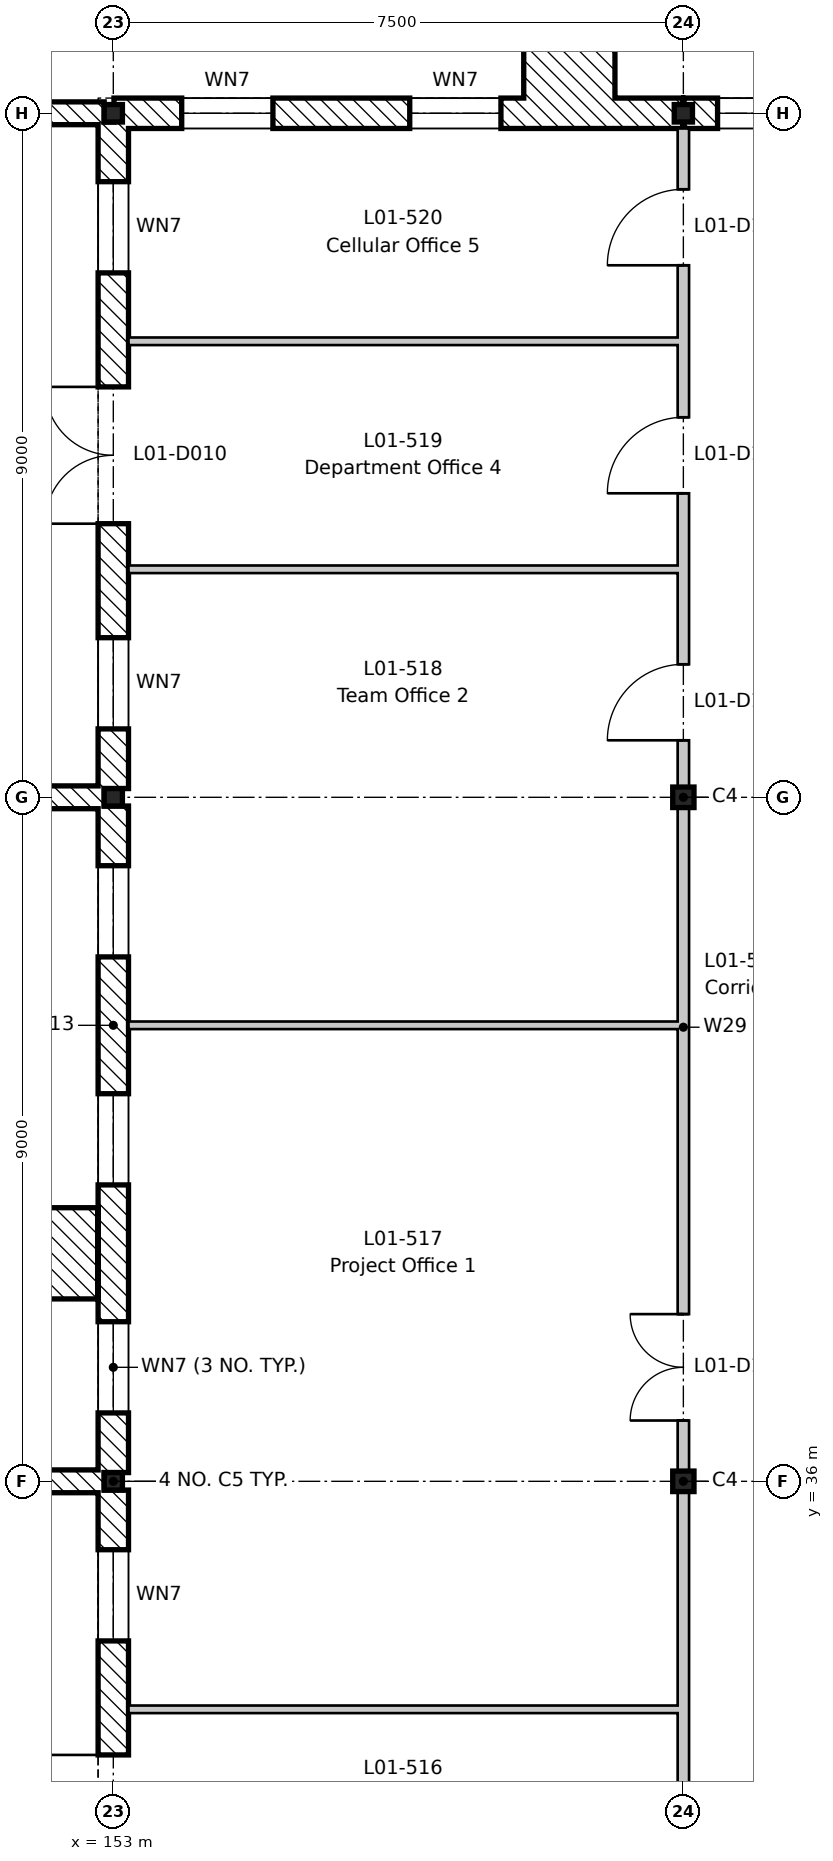
"""IFC4 building model, lengths in metres.
Left out: names, types, materials, properties, quantities, classifications, styles, units other than length and angle.
Written with IfcOpenShell. Run it as: python <this file> out.ifc"""

import sys

from ifc_helpers import new_model, si_unit, direction, frame, frame_2d, origin, origin_2d, place, context, subcontext, project, spatial, rectangle, i_section, extrude, element, fill, save


model = new_model("IFC4")
c1 = context("Model", 3, precision=1e-05, world=origin(), true_north=direction((0.0, 1.0)))
c2 = subcontext(c1, "Body", "Model", "MODEL_VIEW")
j1 = project(units=[si_unit("LENGTHUNIT", "METRE"), si_unit("PLANEANGLEUNIT", "RADIAN")], contexts=[c1])
p1 = place(None, origin())
s1 = spatial("IfcSite", under=j1, at=p1, CompositionType="ELEMENT")
p2 = place(p1, origin())
s2 = spatial("IfcBuilding", under=s1, at=p2, CompositionType="ELEMENT")
p3 = place(p2, frame((0.0, 0.0, 5.4)))
s3 = spatial("IfcBuildingStorey", under=s2, at=p3, CompositionType="ELEMENT", Elevation=5.4)
for number, where, z_axis, x_axis in (
    (1, (153.0, 36.0, -0.2), (0.0, 0.0, 1.0), (1.0, 0.0, 0.0)),
    (2, (153.0, 45.0, -0.2), (0.0, 0.0, 1.0), (1.0, 0.0, 0.0)),
    (3, (153.0, 54.0, -0.2), (0.0, 0.0, 1.0), (1.0, 0.0, 0.0)),
):
    element("IfcColumn", number, at=place(p3, frame(where, z_axis=z_axis, x_axis=x_axis)), inside=s3, PredefinedType="COLUMN", context=c2, shape_type="SweptSolid", body=[
        extrude(i_section(OverallWidth=0.24, OverallDepth=0.23, WebThickness=0.008, FlangeThickness=0.012, FilletRadius=0.021, at=origin_2d()), origin(), (0.0, 0.0, 1.0), 4.5),
    ])
for number, where, z_axis, x_axis in (
    (4, (160.5, 36.0, -0.2), (0.0, 0.0, 1.0), (1.0, 0.0, 0.0)),
    (5, (160.5, 45.0, -0.2), (0.0, 0.0, 1.0), (1.0, 0.0, 0.0)),
):
    element("IfcColumn", number, at=place(p3, frame(where, z_axis=z_axis, x_axis=x_axis)), inside=s3, PredefinedType="COLUMN", context=c2, shape_type="SweptSolid", body=[
        extrude(i_section(OverallWidth=0.28, OverallDepth=0.27, WebThickness=0.008, FlangeThickness=0.013, FilletRadius=0.024, at=origin_2d()), origin(), (0.0, 0.0, 1.0), 4.5),
    ])
p4 = place(p3, frame((160.5, 54.0, -0.2), z_axis=(0.0, 0.0, 1.0), x_axis=(1.0, 0.0, 0.0)))
e6 = element("IfcColumn", 6, at=p4, inside=s3, PredefinedType="COLUMN", context=c2, shape_type="SweptSolid", body=[
    extrude(i_section(OverallWidth=0.24, OverallDepth=0.23, WebThickness=0.008, FlangeThickness=0.012, FilletRadius=0.021, at=origin_2d()), origin(), (0.0, 0.0, 1.0), 4.5),
])
p5 = place(p3, frame((153.0, 27.115, 0.0), z_axis=(0.0, 0.0, 1.0), x_axis=(0.0, 1.0, 0.0)))
e7 = element("IfcWall", 7, at=p5, inside=s3, PredefinedType="STANDARD", context=c2, shape_type="SweptSolid", body=[
    extrude(rectangle(XDim=8.77, YDim=0.4, at=frame_2d((4.385, 0.0))), origin(), (0.0, 0.0, 1.0), 3.9),
])
p6 = place(p5, frame((3.485, 0.0, 0.0)))
e8 = element("IfcOpeningElement", 8, at=p6, cuts=e7, PredefinedType="OPENING", context=c2, shape_type="SweptSolid", body=[
    extrude(rectangle(XDim=1.8, YDim=2.4, at=frame_2d((0.9, 1.2))), frame((0.0, 0.21, 0.0), z_axis=(0.0, -1.0, 0.0), x_axis=(1.0, 0.0, 0.0)), (0.0, 0.0, 1.0), 0.42),
])
p7 = place(p5, frame((0.785, 0.0, 0.9)))
e9 = element("IfcOpeningElement", 9, at=p7, cuts=e7, PredefinedType="OPENING", context=c2, shape_type="SweptSolid", body=[
    extrude(rectangle(XDim=1.2, YDim=2.4, at=frame_2d((0.6, 1.2))), frame((0.0, 0.21, 0.0), z_axis=(0.0, -1.0, 0.0), x_axis=(1.0, 0.0, 0.0)), (0.0, 0.0, 1.0), 0.42),
])
p8 = place(p5, frame((6.785, 0.0, 0.9)))
e10 = element("IfcOpeningElement", 10, at=p8, cuts=e7, PredefinedType="OPENING", context=c2, shape_type="SweptSolid", body=[
    extrude(rectangle(XDim=1.2, YDim=2.4, at=frame_2d((0.6, 1.2))), frame((0.0, 0.21, 0.0), z_axis=(0.0, -1.0, 0.0), x_axis=(1.0, 0.0, 0.0)), (0.0, 0.0, 1.0), 0.42),
])
p9 = place(p3, frame((153.0, 36.115, 0.0), z_axis=(0.0, 0.0, 1.0), x_axis=(0.0, 1.0, 0.0)))
e11 = element("IfcWall", 11, at=p9, inside=s3, PredefinedType="STANDARD", context=c2, shape_type="SweptSolid", body=[
    extrude(rectangle(XDim=8.77, YDim=0.4, at=frame_2d((4.385, 0.0))), origin(), (0.0, 0.0, 1.0), 3.9),
])
p10 = place(p9, frame((0.785, 0.0, 0.9)))
e12 = element("IfcOpeningElement", 12, at=p10, cuts=e11, PredefinedType="OPENING", context=c2, shape_type="SweptSolid", body=[
    extrude(rectangle(XDim=1.2, YDim=2.4, at=frame_2d((0.6, 1.2))), frame((0.0, 0.21, 0.0), z_axis=(0.0, -1.0, 0.0), x_axis=(1.0, 0.0, 0.0)), (0.0, 0.0, 1.0), 0.42),
])
p11 = place(p9, frame((3.785, 0.0, 0.9)))
e13 = element("IfcOpeningElement", 13, at=p11, cuts=e11, PredefinedType="OPENING", context=c2, shape_type="SweptSolid", body=[
    extrude(rectangle(XDim=1.2, YDim=2.4, at=frame_2d((0.6, 1.2))), frame((0.0, 0.21, 0.0), z_axis=(0.0, -1.0, 0.0), x_axis=(1.0, 0.0, 0.0)), (0.0, 0.0, 1.0), 0.42),
])
p12 = place(p9, frame((6.785, 0.0, 0.9)))
e14 = element("IfcOpeningElement", 14, at=p12, cuts=e11, PredefinedType="OPENING", context=c2, shape_type="SweptSolid", body=[
    extrude(rectangle(XDim=1.2, YDim=2.4, at=frame_2d((0.6, 1.2))), frame((0.0, 0.21, 0.0), z_axis=(0.0, -1.0, 0.0), x_axis=(1.0, 0.0, 0.0)), (0.0, 0.0, 1.0), 0.42),
])
p13 = place(p3, frame((153.0, 45.115, 0.0), z_axis=(0.0, 0.0, 1.0), x_axis=(0.0, 1.0, 0.0)))
e15 = element("IfcWall", 15, at=p13, inside=s3, PredefinedType="STANDARD", context=c2, shape_type="SweptSolid", body=[
    extrude(rectangle(XDim=8.77, YDim=0.4, at=frame_2d((4.385, 0.0))), origin(), (0.0, 0.0, 1.0), 3.9),
])
p14 = place(p13, frame((3.485, 0.0, 0.0)))
e16 = element("IfcOpeningElement", 16, at=p14, cuts=e15, PredefinedType="OPENING", context=c2, shape_type="SweptSolid", body=[
    extrude(rectangle(XDim=1.8, YDim=2.4, at=frame_2d((0.9, 1.2))), frame((0.0, 0.21, 0.0), z_axis=(0.0, -1.0, 0.0), x_axis=(1.0, 0.0, 0.0)), (0.0, 0.0, 1.0), 0.42),
])
p15 = place(p13, frame((0.785, 0.0, 0.9)))
e17 = element("IfcOpeningElement", 17, at=p15, cuts=e15, PredefinedType="OPENING", context=c2, shape_type="SweptSolid", body=[
    extrude(rectangle(XDim=1.2, YDim=2.4, at=frame_2d((0.6, 1.2))), frame((0.0, 0.21, 0.0), z_axis=(0.0, -1.0, 0.0), x_axis=(1.0, 0.0, 0.0)), (0.0, 0.0, 1.0), 0.42),
])
p16 = place(p13, frame((6.785, 0.0, 0.9)))
e18 = element("IfcOpeningElement", 18, at=p16, cuts=e15, PredefinedType="OPENING", context=c2, shape_type="SweptSolid", body=[
    extrude(rectangle(XDim=1.2, YDim=2.4, at=frame_2d((0.6, 1.2))), frame((0.0, 0.21, 0.0), z_axis=(0.0, -1.0, 0.0), x_axis=(1.0, 0.0, 0.0)), (0.0, 0.0, 1.0), 0.42),
])
p17 = place(p3, frame((153.009, 54.0, 0.0), z_axis=(0.0, 0.0, 1.0), x_axis=(1.0, 0.0, 0.0)))
e19 = element("IfcWall", 19, at=p17, inside=s3, PredefinedType="STANDARD", context=c2, shape_type="SweptSolid", body=[
    extrude(rectangle(XDim=7.482, YDim=0.4, at=frame_2d((3.741, 0.0))), origin(), (0.0, 0.0, 1.0), 3.97),
])
p18 = place(p17, frame((0.891, 0.0, 0.9)))
e20 = element("IfcOpeningElement", 20, at=p18, cuts=e19, PredefinedType="OPENING", context=c2, shape_type="SweptSolid", body=[
    extrude(rectangle(XDim=1.2, YDim=2.4, at=frame_2d((0.6, 1.2))), frame((0.0, 0.21, 0.0), z_axis=(0.0, -1.0, 0.0), x_axis=(1.0, 0.0, 0.0)), (0.0, 0.0, 1.0), 0.42),
])
p19 = place(p17, frame((3.891, 0.0, 0.9)))
e21 = element("IfcOpeningElement", 21, at=p19, cuts=e19, PredefinedType="OPENING", context=c2, shape_type="SweptSolid", body=[
    extrude(rectangle(XDim=1.2, YDim=2.4, at=frame_2d((0.6, 1.2))), frame((0.0, 0.21, 0.0), z_axis=(0.0, -1.0, 0.0), x_axis=(1.0, 0.0, 0.0)), (0.0, 0.0, 1.0), 0.42),
])
p20 = place(p3, frame((160.509, 54.0, 0.0), z_axis=(0.0, 0.0, 1.0), x_axis=(1.0, 0.0, 0.0)))
e22 = element("IfcWall", 22, at=p20, inside=s3, PredefinedType="STANDARD", context=c2, shape_type="SweptSolid", body=[
    extrude(rectangle(XDim=2.982, YDim=0.4, at=frame_2d((1.491, 0.0))), origin(), (0.0, 0.0, 1.0), 4.1),
])
p21 = place(p20, frame((0.441, 0.0, 0.9)))
e23 = element("IfcOpeningElement", 23, at=p21, cuts=e22, PredefinedType="OPENING", context=c2, shape_type="SweptSolid", body=[
    extrude(rectangle(XDim=2.1, YDim=2.1, at=frame_2d((1.05, 1.05))), frame((0.0, 0.21, 0.0), z_axis=(0.0, -1.0, 0.0), x_axis=(1.0, 0.0, 0.0)), (0.0, 0.0, 1.0), 0.42),
])
for number, where, z_axis, x_axis in (
    (24, (152.2, 38.4, 0.0), (0.0, 0.0, 1.0), (0.0, 1.0, 0.0)),
    (25, (158.4, 54.8, 0.0), (0.0, 0.0, 1.0), (1.0, 0.0, 0.0)),
):
    element("IfcWall", number, at=place(p3, frame(where, z_axis=z_axis, x_axis=x_axis)), inside=s3, PredefinedType="STANDARD", context=c2, shape_type="SweptSolid", body=[
        extrude(rectangle(XDim=1.2, YDim=1.2, at=frame_2d((0.6, 0.0))), origin(), (0.0, 0.0, 1.0), 4.5),
    ])
p22 = place(p3, frame((152.88, 36.0, 0.0), z_axis=(0.0, 0.0, 1.0), x_axis=(-1.0, 0.0, 0.0)))
e26 = element("IfcWall", 26, at=p22, inside=s3, PredefinedType="STANDARD", context=c2, shape_type="SweptSolid", body=[
    extrude(rectangle(XDim=2.88, YDim=0.3, at=frame_2d((1.44, 0.0))), origin(), (0.0, 0.0, 1.0), 3.97),
])
for number, where, z_axis, x_axis in (
    (27, (152.88, 45.0, 0.0), (0.0, 0.0, 1.0), (-1.0, 0.0, 0.0)),
    (28, (152.88, 54.0, 0.0), (0.0, 0.0, 1.0), (-1.0, 0.0, 0.0)),
):
    element("IfcWall", number, at=place(p3, frame(where, z_axis=z_axis, x_axis=x_axis)), inside=s3, PredefinedType="STANDARD", context=c2, shape_type="SweptSolid", body=[
        extrude(rectangle(XDim=2.28, YDim=0.3, at=frame_2d((1.14, 0.0))), origin(), (0.0, 0.0, 1.0), 3.97),
    ])
for number, where, z_axis, x_axis in (
    (29, (153.2, 33.0, 0.0), (0.0, 0.0, 1.0), (1.0, 0.0, 0.0)),
    (30, (153.2, 42.0, 0.0), (0.0, 0.0, 1.0), (1.0, 0.0, 0.0)),
    (31, (153.2, 48.0, 0.0), (0.0, 0.0, 1.0), (1.0, 0.0, 0.0)),
    (32, (153.2, 51.0, 0.0), (0.0, 0.0, 1.0), (1.0, 0.0, 0.0)),
):
    element("IfcWall", number, at=place(p3, frame(where, z_axis=z_axis, x_axis=x_axis)), inside=s3, PredefinedType="PARTITIONING", context=c2, shape_type="SweptSolid", body=[
        extrude(rectangle(XDim=7.225, YDim=0.1, at=frame_2d((3.613, 0.0))), origin(), (0.0, 0.0, 1.0), 4.3),
    ])
p23 = place(p3, frame((160.5, -8.8, 0.0), z_axis=(0.0, 0.0, 1.0), x_axis=(0.0, 1.0, 0.0)))
e33 = element("IfcWall", 33, at=p23, inside=s3, PredefinedType="PARTITIONING", context=c2, shape_type="SweptSolid", body=[
    extrude(rectangle(XDim=62.6, YDim=0.15, at=frame_2d((31.3, 0.0))), origin(), (0.0, 0.0, 1.0), 3.78),
])
p24 = place(p23, frame((3.6, 0.0, 0.0)))
e34 = element("IfcOpeningElement", 34, at=p24, cuts=e33, PredefinedType="OPENING", context=c2, shape_type="SweptSolid", body=[
    extrude(rectangle(XDim=1.4, YDim=2.1, at=frame_2d((0.7, 1.05))), frame((0.0, 0.085, 0.0), z_axis=(0.0, -1.0, 0.0), x_axis=(1.0, 0.0, 0.0)), (0.0, 0.0, 1.0), 0.17),
])
p25 = place(p23, frame((9.8, 0.0, 0.0)))
e35 = element("IfcOpeningElement", 35, at=p25, cuts=e33, PredefinedType="OPENING", context=c2, shape_type="SweptSolid", body=[
    extrude(rectangle(XDim=1.0, YDim=2.1, at=frame_2d((0.5, 1.05))), frame((0.0, 0.085, 0.0), z_axis=(0.0, -1.0, 0.0), x_axis=(1.0, 0.0, 0.0)), (0.0, 0.0, 1.0), 0.17),
])
p26 = place(p23, frame((14.3, 0.0, 0.0)))
e36 = element("IfcOpeningElement", 36, at=p26, cuts=e33, PredefinedType="OPENING", context=c2, shape_type="SweptSolid", body=[
    extrude(rectangle(XDim=1.0, YDim=2.1, at=frame_2d((0.5, 1.05))), frame((0.0, 0.085, 0.0), z_axis=(0.0, -1.0, 0.0), x_axis=(1.0, 0.0, 0.0)), (0.0, 0.0, 1.0), 0.17),
])
p27 = place(p23, frame((20.3, 0.0, 0.0)))
e37 = element("IfcOpeningElement", 37, at=p27, cuts=e33, PredefinedType="OPENING", context=c2, shape_type="SweptSolid", body=[
    extrude(rectangle(XDim=1.0, YDim=2.1, at=frame_2d((0.5, 1.05))), frame((0.0, 0.085, 0.0), z_axis=(0.0, -1.0, 0.0), x_axis=(1.0, 0.0, 0.0)), (0.0, 0.0, 1.0), 0.17),
])
p28 = place(p23, frame((24.8, 0.0, 0.0)))
e38 = element("IfcOpeningElement", 38, at=p28, cuts=e33, PredefinedType="OPENING", context=c2, shape_type="SweptSolid", body=[
    extrude(rectangle(XDim=1.0, YDim=2.1, at=frame_2d((0.5, 1.05))), frame((0.0, 0.085, 0.0), z_axis=(0.0, -1.0, 0.0), x_axis=(1.0, 0.0, 0.0)), (0.0, 0.0, 1.0), 0.17),
])
p29 = place(p23, frame((27.8, 0.0, 0.0)))
e39 = element("IfcOpeningElement", 39, at=p29, cuts=e33, PredefinedType="OPENING", context=c2, shape_type="SweptSolid", body=[
    extrude(rectangle(XDim=1.0, YDim=2.1, at=frame_2d((0.5, 1.05))), frame((0.0, 0.085, 0.0), z_axis=(0.0, -1.0, 0.0), x_axis=(1.0, 0.0, 0.0)), (0.0, 0.0, 1.0), 0.17),
])
p30 = place(p23, frame((32.3, 0.0, 0.0)))
e40 = element("IfcOpeningElement", 40, at=p30, cuts=e33, PredefinedType="OPENING", context=c2, shape_type="SweptSolid", body=[
    extrude(rectangle(XDim=1.0, YDim=2.1, at=frame_2d((0.5, 1.05))), frame((0.0, 0.085, 0.0), z_axis=(0.0, -1.0, 0.0), x_axis=(1.0, 0.0, 0.0)), (0.0, 0.0, 1.0), 0.17),
])
p31 = place(p23, frame((36.8, 0.0, 0.0)))
e41 = element("IfcOpeningElement", 41, at=p31, cuts=e33, PredefinedType="OPENING", context=c2, shape_type="SweptSolid", body=[
    extrude(rectangle(XDim=1.0, YDim=2.1, at=frame_2d((0.5, 1.05))), frame((0.0, 0.085, 0.0), z_axis=(0.0, -1.0, 0.0), x_axis=(1.0, 0.0, 0.0)), (0.0, 0.0, 1.0), 0.17),
])
p32 = place(p23, frame((39.8, 0.0, 0.0)))
e42 = element("IfcOpeningElement", 42, at=p32, cuts=e33, PredefinedType="OPENING", context=c2, shape_type="SweptSolid", body=[
    extrude(rectangle(XDim=1.0, YDim=2.1, at=frame_2d((0.5, 1.05))), frame((0.0, 0.085, 0.0), z_axis=(0.0, -1.0, 0.0), x_axis=(1.0, 0.0, 0.0)), (0.0, 0.0, 1.0), 0.17),
])
p33 = place(p23, frame((45.6, 0.0, 0.0)))
e43 = element("IfcOpeningElement", 43, at=p33, cuts=e33, PredefinedType="OPENING", context=c2, shape_type="SweptSolid", body=[
    extrude(rectangle(XDim=1.4, YDim=2.1, at=frame_2d((0.7, 1.05))), frame((0.0, 0.085, 0.0), z_axis=(0.0, -1.0, 0.0), x_axis=(1.0, 0.0, 0.0)), (0.0, 0.0, 1.0), 0.17),
])
p34 = place(p23, frame((54.55, 0.0, 0.0)))
e44 = element("IfcOpeningElement", 44, at=p34, cuts=e33, PredefinedType="OPENING", context=c2, shape_type="SweptSolid", body=[
    extrude(rectangle(XDim=1.0, YDim=2.1, at=frame_2d((0.5, 1.05))), frame((0.0, 0.085, 0.0), z_axis=(0.0, -1.0, 0.0), x_axis=(1.0, 0.0, 0.0)), (0.0, 0.0, 1.0), 0.17),
])
p35 = place(p23, frame((57.8, 0.0, 0.0)))
e45 = element("IfcOpeningElement", 45, at=p35, cuts=e33, PredefinedType="OPENING", context=c2, shape_type="SweptSolid", body=[
    extrude(rectangle(XDim=1.0, YDim=2.1, at=frame_2d((0.5, 1.05))), frame((0.0, 0.085, 0.0), z_axis=(0.0, -1.0, 0.0), x_axis=(1.0, 0.0, 0.0)), (0.0, 0.0, 1.0), 0.17),
])
p36 = place(p23, frame((60.8, 0.0, 0.0)))
e46 = element("IfcOpeningElement", 46, at=p36, cuts=e33, PredefinedType="OPENING", context=c2, shape_type="SweptSolid", body=[
    extrude(rectangle(XDim=1.0, YDim=2.1, at=frame_2d((0.5, 1.05))), frame((0.0, 0.085, 0.0), z_axis=(0.0, -1.0, 0.0), x_axis=(1.0, 0.0, 0.0)), (0.0, 0.0, 1.0), 0.17),
])
p37 = place(p6, origin())
e47 = element("IfcDoor", 47, at=p37, inside=s3, OperationType="DOUBLE_DOOR_SINGLE_SWING", PredefinedType="DOOR", context=c2, shape_type="SweptSolid", body=[
    extrude(rectangle(XDim=1.8, YDim=2.4, at=frame_2d((0.9, 1.2))), frame((0.0, 0.025, 0.0), z_axis=(0.0, -1.0, 0.0), x_axis=(1.0, 0.0, 0.0)), (0.0, 0.0, 1.0), 0.05),
])
fill(e8, e47)
p38 = place(p8, origin())
e48 = element("IfcWindow", 48, at=p38, inside=s3, PartitioningType="SINGLE_PANEL", PredefinedType="WINDOW", context=c2, shape_type="SweptSolid", body=[
    extrude(rectangle(XDim=1.2, YDim=2.4, at=frame_2d((0.6, 1.2))), frame((0.0, -0.12, 0.0), z_axis=(0.0, -1.0, 0.0), x_axis=(1.0, 0.0, 0.0)), (0.0, 0.0, 1.0), 0.06),
])
fill(e10, e48)
p39 = place(p10, origin())
e49 = element("IfcWindow", 49, at=p39, inside=s3, PartitioningType="SINGLE_PANEL", PredefinedType="WINDOW", context=c2, shape_type="SweptSolid", body=[
    extrude(rectangle(XDim=1.2, YDim=2.4, at=frame_2d((0.6, 1.2))), frame((0.0, -0.12, 0.0), z_axis=(0.0, -1.0, 0.0), x_axis=(1.0, 0.0, 0.0)), (0.0, 0.0, 1.0), 0.06),
])
fill(e12, e49)
p40 = place(p11, origin())
e50 = element("IfcWindow", 50, at=p40, inside=s3, PartitioningType="SINGLE_PANEL", PredefinedType="WINDOW", context=c2, shape_type="SweptSolid", body=[
    extrude(rectangle(XDim=1.2, YDim=2.4, at=frame_2d((0.6, 1.2))), frame((0.0, -0.12, 0.0), z_axis=(0.0, -1.0, 0.0), x_axis=(1.0, 0.0, 0.0)), (0.0, 0.0, 1.0), 0.06),
])
fill(e13, e50)
p41 = place(p12, origin())
e51 = element("IfcWindow", 51, at=p41, inside=s3, PartitioningType="SINGLE_PANEL", PredefinedType="WINDOW", context=c2, shape_type="SweptSolid", body=[
    extrude(rectangle(XDim=1.2, YDim=2.4, at=frame_2d((0.6, 1.2))), frame((0.0, -0.12, 0.0), z_axis=(0.0, -1.0, 0.0), x_axis=(1.0, 0.0, 0.0)), (0.0, 0.0, 1.0), 0.06),
])
fill(e14, e51)
p42 = place(p14, origin())
e52 = element("IfcDoor", 52, at=p42, inside=s3, OperationType="DOUBLE_DOOR_SINGLE_SWING", PredefinedType="DOOR", context=c2, shape_type="SweptSolid", body=[
    extrude(rectangle(XDim=1.8, YDim=2.4, at=frame_2d((0.9, 1.2))), frame((0.0, 0.025, 0.0), z_axis=(0.0, -1.0, 0.0), x_axis=(1.0, 0.0, 0.0)), (0.0, 0.0, 1.0), 0.05),
])
fill(e16, e52)
p43 = place(p15, origin())
e53 = element("IfcWindow", 53, at=p43, inside=s3, PartitioningType="SINGLE_PANEL", PredefinedType="WINDOW", context=c2, shape_type="SweptSolid", body=[
    extrude(rectangle(XDim=1.2, YDim=2.4, at=frame_2d((0.6, 1.2))), frame((0.0, -0.12, 0.0), z_axis=(0.0, -1.0, 0.0), x_axis=(1.0, 0.0, 0.0)), (0.0, 0.0, 1.0), 0.06),
])
fill(e17, e53)
p44 = place(p16, origin())
e54 = element("IfcWindow", 54, at=p44, inside=s3, PartitioningType="SINGLE_PANEL", PredefinedType="WINDOW", context=c2, shape_type="SweptSolid", body=[
    extrude(rectangle(XDim=1.2, YDim=2.4, at=frame_2d((0.6, 1.2))), frame((0.0, -0.12, 0.0), z_axis=(0.0, -1.0, 0.0), x_axis=(1.0, 0.0, 0.0)), (0.0, 0.0, 1.0), 0.06),
])
fill(e18, e54)
p45 = place(p18, origin())
e55 = element("IfcWindow", 55, at=p45, inside=s3, PartitioningType="SINGLE_PANEL", PredefinedType="WINDOW", context=c2, shape_type="SweptSolid", body=[
    extrude(rectangle(XDim=1.2, YDim=2.4, at=frame_2d((0.6, 1.2))), frame((0.0, -0.12, 0.0), z_axis=(0.0, -1.0, 0.0), x_axis=(1.0, 0.0, 0.0)), (0.0, 0.0, 1.0), 0.06),
])
fill(e20, e55)
p46 = place(p19, origin())
e56 = element("IfcWindow", 56, at=p46, inside=s3, PartitioningType="SINGLE_PANEL", PredefinedType="WINDOW", context=c2, shape_type="SweptSolid", body=[
    extrude(rectangle(XDim=1.2, YDim=2.4, at=frame_2d((0.6, 1.2))), frame((0.0, -0.12, 0.0), z_axis=(0.0, -1.0, 0.0), x_axis=(1.0, 0.0, 0.0)), (0.0, 0.0, 1.0), 0.06),
])
fill(e21, e56)
p47 = place(p21, origin())
e57 = element("IfcWindow", 57, at=p47, inside=s3, PartitioningType="SINGLE_PANEL", PredefinedType="WINDOW", context=c2, shape_type="SweptSolid", body=[
    extrude(rectangle(XDim=2.1, YDim=2.1, at=frame_2d((1.05, 1.05))), frame((0.0, -0.12, 0.0), z_axis=(0.0, -1.0, 0.0), x_axis=(1.0, 0.0, 0.0)), (0.0, 0.0, 1.0), 0.06),
])
fill(e23, e57)
p48 = place(p33, origin())
e58 = element("IfcDoor", 58, at=p48, inside=s3, OperationType="DOUBLE_DOOR_SINGLE_SWING", PredefinedType="DOOR", context=c2, shape_type="SweptSolid", body=[
    extrude(rectangle(XDim=1.4, YDim=2.1, at=frame_2d((0.7, 1.05))), frame((0.0, 0.025, 0.0), z_axis=(0.0, -1.0, 0.0), x_axis=(1.0, 0.0, 0.0)), (0.0, 0.0, 1.0), 0.05),
])
fill(e43, e58)
p49 = place(p34, origin())
e59 = element("IfcDoor", 59, at=p49, inside=s3, OperationType="SINGLE_SWING_LEFT", PredefinedType="DOOR", context=c2, shape_type="SweptSolid", body=[
    extrude(rectangle(XDim=1.0, YDim=2.1, at=frame_2d((0.5, 1.05))), frame((0.0, 0.025, 0.0), z_axis=(0.0, -1.0, 0.0), x_axis=(1.0, 0.0, 0.0)), (0.0, 0.0, 1.0), 0.05),
])
fill(e44, e59)
p50 = place(p35, origin())
e60 = element("IfcDoor", 60, at=p50, inside=s3, OperationType="SINGLE_SWING_LEFT", PredefinedType="DOOR", context=c2, shape_type="SweptSolid", body=[
    extrude(rectangle(XDim=1.0, YDim=2.1, at=frame_2d((0.5, 1.05))), frame((0.0, 0.025, 0.0), z_axis=(0.0, -1.0, 0.0), x_axis=(1.0, 0.0, 0.0)), (0.0, 0.0, 1.0), 0.05),
])
fill(e45, e60)
p51 = place(p36, origin())
e61 = element("IfcDoor", 61, at=p51, inside=s3, OperationType="SINGLE_SWING_LEFT", PredefinedType="DOOR", context=c2, shape_type="SweptSolid", body=[
    extrude(rectangle(XDim=1.0, YDim=2.1, at=frame_2d((0.5, 1.05))), frame((0.0, 0.025, 0.0), z_axis=(0.0, -1.0, 0.0), x_axis=(1.0, 0.0, 0.0)), (0.0, 0.0, 1.0), 0.05),
])
fill(e46, e61)
save(model, sys.argv[1])
